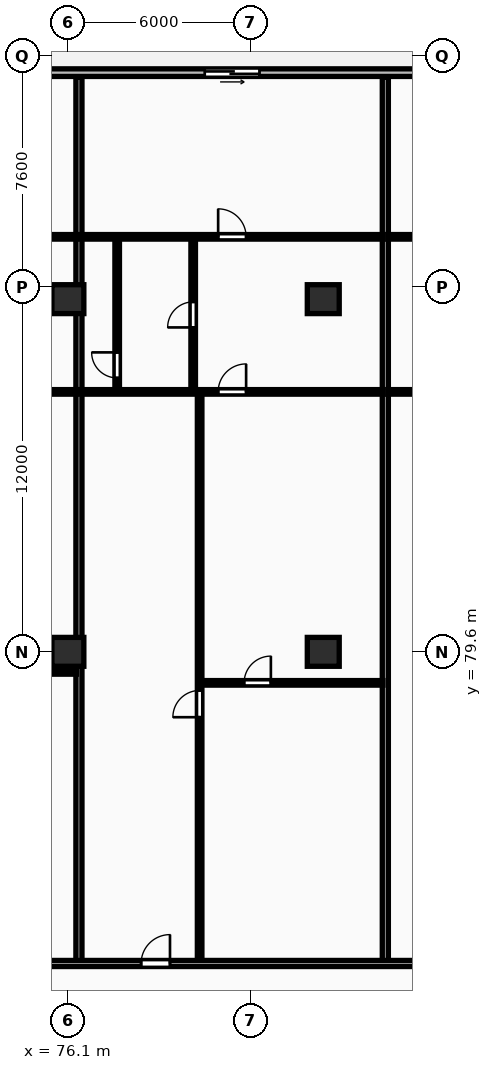
"""IFC4 building model, lengths in metres.
Left out: names, types, materials, properties, quantities, classifications, styles, units other than length and angle.
Written with IfcOpenShell. Run it as: python <this file> out.ifc"""

import sys

from ifc_helpers import new_model, si_unit, direction, frame, frame_2d, origin, origin_2d, place, context, subcontext, project, spatial, rectangle, extrude, element, fill, save


model = new_model("IFC4")
c1 = context("Model", 3, precision=1e-05, world=origin(), true_north=direction((0.0, 1.0)))
c2 = subcontext(c1, "Body", "Model", "MODEL_VIEW")
j1 = project(units=[si_unit("LENGTHUNIT", "METRE"), si_unit("PLANEANGLEUNIT", "RADIAN")], contexts=[c1])
p1 = place(None, origin())
s1 = spatial("IfcSite", under=j1, at=p1, CompositionType="ELEMENT")
p2 = place(p1, origin())
s2 = spatial("IfcBuilding", under=s1, at=p2, CompositionType="ELEMENT")
p3 = place(p2, frame((0.0, 0.0, 24.0)))
s3 = spatial("IfcBuildingStorey", under=s2, at=p3, CompositionType="ELEMENT", Elevation=24.0)
for number, where, z_axis, x_axis in (
    (1, (76.1, 79.6, 0.0), (0.0, 0.0, 1.0), (1.0, 0.0, 0.0)),
    (2, (76.1, 91.2, 0.0), (0.0, 0.0, 1.0), (1.0, 0.0, 0.0)),
    (3, (84.5, 79.6, 0.0), (0.0, 0.0, 1.0), (1.0, 0.0, 0.0)),
    (4, (84.5, 91.2, 0.0), (0.0, 0.0, 1.0), (1.0, 0.0, 0.0)),
):
    element("IfcColumn", number, at=place(p3, frame(where, z_axis=z_axis, x_axis=x_axis)), inside=s3, PredefinedType="COLUMN", context=c2, shape_type="SweptSolid", body=[
        extrude(rectangle(XDim=1.05, YDim=0.95, at=origin_2d()), origin(), (0.0, 0.0, 1.0), 3.25),
    ])
p4 = place(p3, frame((132.9, 98.65, 0.0), z_axis=(0.0, 0.0, 1.0), x_axis=(-1.0, 0.0, 0.0)))
e5 = element("IfcWall", 5, at=p4, inside=s3, PredefinedType="STANDARD", context=c2, shape_type="SweptSolid", body=[
    extrude(rectangle(XDim=77.6, YDim=0.25, at=frame_2d((38.8, 0.0))), origin(), (0.0, 0.0, 1.0), 2.97),
])
p5 = place(p4, frame((71.661, 0.0, 0.0)))
e6 = element("IfcOpeningElement", 6, at=p5, cuts=e5, PredefinedType="OPENING", context=c2, shape_type="SweptSolid", body=[
    extrude(rectangle(XDim=1.8, YDim=2.2, at=frame_2d((0.9, 1.1))), frame((0.0, 0.135, 0.0), z_axis=(0.0, -1.0, 0.0), x_axis=(1.0, 0.0, 0.0)), (0.0, 0.0, 1.0), 0.27),
])
p6 = place(p4, frame((61.079, 0.0, 0.0)))
e7 = element("IfcOpeningElement", 7, at=p6, cuts=e5, PredefinedType="OPENING", context=c2, shape_type="SweptSolid", body=[
    extrude(rectangle(XDim=1.8, YDim=2.2, at=frame_2d((0.9, 1.1))), frame((0.0, 0.135, 0.0), z_axis=(0.0, -1.0, 0.0), x_axis=(1.0, 0.0, 0.0)), (0.0, 0.0, 1.0), 0.27),
])
p7 = place(p4, frame((50.498, 0.0, 0.0)))
e8 = element("IfcOpeningElement", 8, at=p7, cuts=e5, PredefinedType="OPENING", context=c2, shape_type="SweptSolid", body=[
    extrude(rectangle(XDim=1.8, YDim=2.2, at=frame_2d((0.9, 1.1))), frame((0.0, 0.135, 0.0), z_axis=(0.0, -1.0, 0.0), x_axis=(1.0, 0.0, 0.0)), (0.0, 0.0, 1.0), 0.27),
])
p8 = place(p4, frame((39.412, 0.0, 0.0)))
e9 = element("IfcOpeningElement", 9, at=p8, cuts=e5, PredefinedType="OPENING", context=c2, shape_type="SweptSolid", body=[
    extrude(rectangle(XDim=1.8, YDim=2.2, at=frame_2d((0.9, 1.1))), frame((0.0, 0.135, 0.0), z_axis=(0.0, -1.0, 0.0), x_axis=(1.0, 0.0, 0.0)), (0.0, 0.0, 1.0), 0.27),
])
p9 = place(p4, frame((28.326, 0.0, 0.0)))
e10 = element("IfcOpeningElement", 10, at=p9, cuts=e5, PredefinedType="OPENING", context=c2, shape_type="SweptSolid", body=[
    extrude(rectangle(XDim=1.8, YDim=2.2, at=frame_2d((0.9, 1.1))), frame((0.0, 0.135, 0.0), z_axis=(0.0, -1.0, 0.0), x_axis=(1.0, 0.0, 0.0)), (0.0, 0.0, 1.0), 0.27),
])
p10 = place(p4, frame((17.744, 0.0, 0.0)))
e11 = element("IfcOpeningElement", 11, at=p10, cuts=e5, PredefinedType="OPENING", context=c2, shape_type="SweptSolid", body=[
    extrude(rectangle(XDim=1.8, YDim=2.2, at=frame_2d((0.9, 1.1))), frame((0.0, 0.135, 0.0), z_axis=(0.0, -1.0, 0.0), x_axis=(1.0, 0.0, 0.0)), (0.0, 0.0, 1.0), 0.27),
])
p11 = place(p4, frame((6.901, 0.0, 0.0)))
e12 = element("IfcOpeningElement", 12, at=p11, cuts=e5, PredefinedType="OPENING", context=c2, shape_type="SweptSolid", body=[
    extrude(rectangle(XDim=1.8, YDim=2.2, at=frame_2d((0.9, 1.1))), frame((0.0, 0.135, 0.0), z_axis=(0.0, -1.0, 0.0), x_axis=(1.0, 0.0, 0.0)), (0.0, 0.0, 1.0), 0.27),
])
p12 = place(p4, frame((0.6, 0.0, 0.85)))
e13 = element("IfcOpeningElement", 13, at=p12, cuts=e5, PredefinedType="OPENING", context=c2, shape_type="SweptSolid", body=[
    extrude(rectangle(XDim=1.8, YDim=1.8, at=frame_2d((0.9, 0.9))), frame((0.0, 0.135, 0.0), z_axis=(0.0, -1.0, 0.0), x_axis=(1.0, 0.0, 0.0)), (0.0, 0.0, 1.0), 0.27),
])
p13 = place(p3, frame((76.464, 69.43, 0.0), z_axis=(0.0, 0.0, 1.0), x_axis=(0.0, 1.0, 0.0)))
e14 = element("IfcWall", 14, at=p13, inside=s3, PredefinedType="PARTITIONING", context=c2, shape_type="SweptSolid", body=[
    extrude(rectangle(XDim=29.07, YDim=0.2, at=frame_2d((14.535, 0.0))), origin(), (0.0, 0.0, 1.0), 2.22),
])
p14 = place(p3, frame((69.408, 78.94, 0.0), z_axis=(0.0, 0.0, 1.0), x_axis=(1.0, 0.0, 0.0)))
e15 = element("IfcWall", 15, at=p14, inside=s3, PredefinedType="PARTITIONING", context=c2, shape_type="SweptSolid", body=[
    extrude(rectangle(XDim=6.976, YDim=0.15, at=frame_2d((3.488, 0.0))), origin(), (0.0, 0.0, 1.0), 2.97),
])
p15 = place(p14, frame((2.268, 0.0, 0.0)))
e16 = element("IfcOpeningElement", 16, at=p15, cuts=e15, PredefinedType="OPENING", context=c2, shape_type="SweptSolid", body=[
    extrude(rectangle(XDim=0.88, YDim=2.06, at=frame_2d((0.44, 1.03))), frame((0.0, 0.085, 0.0), z_axis=(0.0, -1.0, 0.0), x_axis=(1.0, 0.0, 0.0)), (0.0, 0.0, 1.0), 0.17),
])
p16 = place(p3, frame((65.458, 88.15, 0.0), z_axis=(0.0, 0.0, 1.0), x_axis=(1.0, 0.0, 0.0)))
e17 = element("IfcWall", 17, at=p16, inside=s3, PredefinedType="PARTITIONING", context=c2, shape_type="SweptSolid", body=[
    extrude(rectangle(XDim=10.926, YDim=0.15, at=frame_2d((5.463, 0.0))), origin(), (0.0, 0.0, 1.0), 2.97),
])
p17 = place(p16, frame((5.003, 0.0, 0.0)))
e18 = element("IfcOpeningElement", 18, at=p17, cuts=e17, PredefinedType="OPENING", context=c2, shape_type="SweptSolid", body=[
    extrude(rectangle(XDim=0.92, YDim=2.08, at=frame_2d((0.46, 1.04))), frame((0.0, 0.085, 0.0), z_axis=(0.0, -1.0, 0.0), x_axis=(1.0, 0.0, 0.0)), (0.0, 0.0, 1.0), 0.17),
])
p18 = place(p3, frame((65.458, 93.25, 0.0), z_axis=(0.0, 0.0, 1.0), x_axis=(1.0, 0.0, 0.0)))
e19 = element("IfcWall", 19, at=p18, inside=s3, PredefinedType="PARTITIONING", context=c2, shape_type="SweptSolid", body=[
    extrude(rectangle(XDim=10.926, YDim=0.15, at=frame_2d((5.463, 0.0))), origin(), (0.0, 0.0, 1.0), 2.97),
])
p19 = place(p18, frame((5.003, 0.0, 0.0)))
e20 = element("IfcOpeningElement", 20, at=p19, cuts=e19, PredefinedType="OPENING", context=c2, shape_type="SweptSolid", body=[
    extrude(rectangle(XDim=0.92, YDim=2.08, at=frame_2d((0.46, 1.04))), frame((0.0, 0.085, 0.0), z_axis=(0.0, -1.0, 0.0), x_axis=(1.0, 0.0, 0.0)), (0.0, 0.0, 1.0), 0.17),
])
p20 = place(p3, frame((86.542, 69.43, 0.0), z_axis=(0.0, 0.0, 1.0), x_axis=(0.0, 1.0, 0.0)))
e21 = element("IfcWall", 21, at=p20, inside=s3, PredefinedType="PARTITIONING", context=c2, shape_type="SweptSolid", body=[
    extrude(rectangle(XDim=29.07, YDim=0.2, at=frame_2d((14.535, 0.0))), origin(), (0.0, 0.0, 1.0), 2.97),
])
p21 = place(p3, frame((80.494, 78.58, 0.0), z_axis=(0.0, 0.0, 1.0), x_axis=(1.0, 0.0, 0.0)))
e22 = element("IfcWall", 22, at=p21, inside=s3, PredefinedType="PARTITIONING", context=c2, shape_type="SweptSolid", body=[
    extrude(rectangle(XDim=5.968, YDim=0.15, at=frame_2d((2.984, 0.0))), origin(), (0.0, 0.0, 1.0), 2.97),
])
p22 = place(p21, frame((1.403, 0.0, 0.0)))
e23 = element("IfcOpeningElement", 23, at=p22, cuts=e22, PredefinedType="OPENING", context=c2, shape_type="SweptSolid", body=[
    extrude(rectangle(XDim=0.88, YDim=2.06, at=frame_2d((0.44, 1.03))), frame((0.0, 0.085, 0.0), z_axis=(0.0, -1.0, 0.0), x_axis=(1.0, 0.0, 0.0)), (0.0, 0.0, 1.0), 0.17),
])
p23 = place(p3, frame((80.434, 69.41, 0.0), z_axis=(0.0, 0.0, 1.0), x_axis=(0.0, 1.0, 0.0)))
e24 = element("IfcWall", 24, at=p23, inside=s3, PredefinedType="PARTITIONING", context=c2, shape_type="SweptSolid", body=[
    extrude(rectangle(XDim=18.7, YDim=0.15, at=frame_2d((9.35, 0.0))), origin(), (0.0, 0.0, 1.0), 2.97),
])
p24 = place(p23, frame((8.04, 0.0, 0.0)))
e25 = element("IfcOpeningElement", 25, at=p24, cuts=e24, PredefinedType="OPENING", context=c2, shape_type="SweptSolid", body=[
    extrude(rectangle(XDim=0.88, YDim=2.06, at=frame_2d((0.44, 1.03))), frame((0.0, 0.085, 0.0), z_axis=(0.0, -1.0, 0.0), x_axis=(1.0, 0.0, 0.0)), (0.0, 0.0, 1.0), 0.17),
])
p25 = place(p3, frame((77.721, 88.19, 0.0), z_axis=(0.0, 0.0, 1.0), x_axis=(0.0, 1.0, 0.0)))
e26 = element("IfcWall", 26, at=p25, inside=s3, PredefinedType="PARTITIONING", context=c2, shape_type="SweptSolid", body=[
    extrude(rectangle(XDim=5.0, YDim=0.15, at=frame_2d((2.5, 0.0))), origin(), (0.0, 0.0, 1.0), 2.97),
])
p26 = place(p25, frame((0.419, 0.0, 0.0)))
e27 = element("IfcOpeningElement", 27, at=p26, cuts=e26, PredefinedType="OPENING", context=c2, shape_type="SweptSolid", body=[
    extrude(rectangle(XDim=0.84, YDim=2.04, at=frame_2d((0.42, 1.02))), frame((0.0, 0.085, 0.0), z_axis=(0.0, -1.0, 0.0), x_axis=(1.0, 0.0, 0.0)), (0.0, 0.0, 1.0), 0.17),
])
p27 = place(p3, frame((80.221, 88.19, 0.0), z_axis=(0.0, 0.0, 1.0), x_axis=(0.0, 1.0, 0.0)))
e28 = element("IfcWall", 28, at=p27, inside=s3, PredefinedType="PARTITIONING", context=c2, shape_type="SweptSolid", body=[
    extrude(rectangle(XDim=5.0, YDim=0.15, at=frame_2d((2.5, 0.0))), origin(), (0.0, 0.0, 1.0), 2.97),
])
p28 = place(p27, frame((2.08, 0.0, 0.0)))
e29 = element("IfcOpeningElement", 29, at=p28, cuts=e28, PredefinedType="OPENING", context=c2, shape_type="SweptSolid", body=[
    extrude(rectangle(XDim=0.84, YDim=2.04, at=frame_2d((0.42, 1.02))), frame((0.0, 0.085, 0.0), z_axis=(0.0, -1.0, 0.0), x_axis=(1.0, 0.0, 0.0)), (0.0, 0.0, 1.0), 0.17),
])
p29 = place(p3, frame((76.544, 88.15, 0.0), z_axis=(0.0, 0.0, 1.0), x_axis=(1.0, 0.0, 0.0)))
e30 = element("IfcWall", 30, at=p29, inside=s3, PredefinedType="PARTITIONING", context=c2, shape_type="SweptSolid", body=[
    extrude(rectangle(XDim=9.918, YDim=0.15, at=frame_2d((4.959, 0.0))), origin(), (0.0, 0.0, 1.0), 2.97),
])
p30 = place(p29, frame((4.499, 0.0, 0.0)))
e31 = element("IfcOpeningElement", 31, at=p30, cuts=e30, PredefinedType="OPENING", context=c2, shape_type="SweptSolid", body=[
    extrude(rectangle(XDim=0.92, YDim=2.08, at=frame_2d((0.46, 1.04))), frame((0.0, 0.085, 0.0), z_axis=(0.0, -1.0, 0.0), x_axis=(1.0, 0.0, 0.0)), (0.0, 0.0, 1.0), 0.17),
])
p31 = place(p3, frame((76.544, 93.25, 0.0), z_axis=(0.0, 0.0, 1.0), x_axis=(1.0, 0.0, 0.0)))
e32 = element("IfcWall", 32, at=p31, inside=s3, PredefinedType="PARTITIONING", context=c2, shape_type="SweptSolid", body=[
    extrude(rectangle(XDim=9.918, YDim=0.15, at=frame_2d((4.959, 0.0))), origin(), (0.0, 0.0, 1.0), 2.97),
])
p32 = place(p31, frame((4.499, 0.0, 0.0)))
e33 = element("IfcOpeningElement", 33, at=p32, cuts=e32, PredefinedType="OPENING", context=c2, shape_type="SweptSolid", body=[
    extrude(rectangle(XDim=0.92, YDim=2.08, at=frame_2d((0.46, 1.04))), frame((0.0, 0.085, 0.0), z_axis=(0.0, -1.0, 0.0), x_axis=(1.0, 0.0, 0.0)), (0.0, 0.0, 1.0), 0.17),
])
p33 = place(p3, frame((86.622, 88.15, 0.0), z_axis=(0.0, 0.0, 1.0), x_axis=(1.0, 0.0, 0.0)))
e34 = element("IfcWall", 34, at=p33, inside=s3, PredefinedType="PARTITIONING", context=c2, shape_type="SweptSolid", body=[
    extrude(rectangle(XDim=11.933, YDim=0.15, at=frame_2d((5.967, 0.0))), origin(), (0.0, 0.0, 1.0), 2.97),
])
p34 = place(p33, frame((5.914, 0.0, 0.0)))
e35 = element("IfcOpeningElement", 35, at=p34, cuts=e34, PredefinedType="OPENING", context=c2, shape_type="SweptSolid", body=[
    extrude(rectangle(XDim=0.92, YDim=2.08, at=frame_2d((0.46, 1.04))), frame((0.0, 0.085, 0.0), z_axis=(0.0, -1.0, 0.0), x_axis=(1.0, 0.0, 0.0)), (0.0, 0.0, 1.0), 0.17),
])
p35 = place(p3, frame((86.622, 93.25, 0.0), z_axis=(0.0, 0.0, 1.0), x_axis=(1.0, 0.0, 0.0)))
e36 = element("IfcWall", 36, at=p35, inside=s3, PredefinedType="PARTITIONING", context=c2, shape_type="SweptSolid", body=[
    extrude(rectangle(XDim=11.933, YDim=0.15, at=frame_2d((5.967, 0.0))), origin(), (0.0, 0.0, 1.0), 2.97),
])
p36 = place(p35, frame((8.812, 0.0, 0.0)))
e37 = element("IfcOpeningElement", 37, at=p36, cuts=e36, PredefinedType="OPENING", context=c2, shape_type="SweptSolid", body=[
    extrude(rectangle(XDim=0.92, YDim=2.08, at=frame_2d((0.46, 1.04))), frame((0.0, 0.085, 0.0), z_axis=(0.0, -1.0, 0.0), x_axis=(1.0, 0.0, 0.0)), (0.0, 0.0, 1.0), 0.17),
])
p37 = place(p3, frame((55.3, 69.35, 0.0), z_axis=(0.0, 0.0, 1.0), x_axis=(1.0, 0.0, 0.0)))
e38 = element("IfcWall", 38, at=p37, inside=s3, PredefinedType="PARTITIONING", context=c2, shape_type="SweptSolid", body=[
    extrude(rectangle(XDim=77.6, YDim=0.2, at=frame_2d((38.8, 0.0))), origin(), (0.0, 0.0, 1.0), 2.97),
])
p38 = place(p37, frame((1.81, 0.0, 0.0)))
e39 = element("IfcOpeningElement", 39, at=p38, cuts=e38, PredefinedType="OPENING", context=c2, shape_type="SweptSolid", body=[
    extrude(rectangle(XDim=0.95, YDim=2.15, at=frame_2d((0.475, 1.075))), frame((0.0, 0.11, 0.0), z_axis=(0.0, -1.0, 0.0), x_axis=(1.0, 0.0, 0.0)), (0.0, 0.0, 1.0), 0.22),
])
p39 = place(p37, frame((10.448, 0.0, 0.0)))
e40 = element("IfcOpeningElement", 40, at=p39, cuts=e38, PredefinedType="OPENING", context=c2, shape_type="SweptSolid", body=[
    extrude(rectangle(XDim=0.95, YDim=2.15, at=frame_2d((0.475, 1.075))), frame((0.0, 0.11, 0.0), z_axis=(0.0, -1.0, 0.0), x_axis=(1.0, 0.0, 0.0)), (0.0, 0.0, 1.0), 0.22),
])
p40 = place(p37, frame((23.208, 0.0, 0.0)))
e41 = element("IfcOpeningElement", 41, at=p40, cuts=e38, PredefinedType="OPENING", context=c2, shape_type="SweptSolid", body=[
    extrude(rectangle(XDim=0.95, YDim=2.15, at=frame_2d((0.475, 1.075))), frame((0.0, 0.11, 0.0), z_axis=(0.0, -1.0, 0.0), x_axis=(1.0, 0.0, 0.0)), (0.0, 0.0, 1.0), 0.22),
])
p41 = place(p37, frame((33.287, 0.0, 0.0)))
e42 = element("IfcOpeningElement", 42, at=p41, cuts=e38, PredefinedType="OPENING", context=c2, shape_type="SweptSolid", body=[
    extrude(rectangle(XDim=0.95, YDim=2.15, at=frame_2d((0.475, 1.075))), frame((0.0, 0.11, 0.0), z_axis=(0.0, -1.0, 0.0), x_axis=(1.0, 0.0, 0.0)), (0.0, 0.0, 1.0), 0.22),
])
p42 = place(p37, frame((44.905, 0.0, 0.0)))
e43 = element("IfcOpeningElement", 43, at=p42, cuts=e38, PredefinedType="OPENING", context=c2, shape_type="SweptSolid", body=[
    extrude(rectangle(XDim=0.95, YDim=2.15, at=frame_2d((0.475, 1.075))), frame((0.0, 0.11, 0.0), z_axis=(0.0, -1.0, 0.0), x_axis=(1.0, 0.0, 0.0)), (0.0, 0.0, 1.0), 0.22),
])
p43 = place(p37, frame((54.119, 0.0, 0.0)))
e44 = element("IfcOpeningElement", 44, at=p43, cuts=e38, PredefinedType="OPENING", context=c2, shape_type="SweptSolid", body=[
    extrude(rectangle(XDim=0.95, YDim=2.15, at=frame_2d((0.475, 1.075))), frame((0.0, 0.11, 0.0), z_axis=(0.0, -1.0, 0.0), x_axis=(1.0, 0.0, 0.0)), (0.0, 0.0, 1.0), 0.22),
])
p44 = place(p37, frame((66.74, 0.0, 0.0)))
e45 = element("IfcOpeningElement", 45, at=p44, cuts=e38, PredefinedType="OPENING", context=c2, shape_type="SweptSolid", body=[
    extrude(rectangle(XDim=0.95, YDim=2.15, at=frame_2d((0.475, 1.075))), frame((0.0, 0.11, 0.0), z_axis=(0.0, -1.0, 0.0), x_axis=(1.0, 0.0, 0.0)), (0.0, 0.0, 1.0), 0.22),
])
p45 = place(p7, origin())
e46 = element("IfcDoor", 46, at=p45, inside=s3, OperationType="SLIDING_TO_LEFT", PredefinedType="DOOR", context=c2, shape_type="SweptSolid", body=[
    extrude(rectangle(XDim=1.8, YDim=2.2, at=frame_2d((0.9, 1.1))), frame((0.0, 0.025, 0.0), z_axis=(0.0, -1.0, 0.0), x_axis=(1.0, 0.0, 0.0)), (0.0, 0.0, 1.0), 0.05),
])
fill(e8, e46)
p46 = place(p22, origin())
e47 = element("IfcDoor", 47, at=p46, inside=s3, OperationType="SINGLE_SWING_RIGHT", PredefinedType="DOOR", context=c2, shape_type="SweptSolid", body=[
    extrude(rectangle(XDim=0.88, YDim=2.06, at=frame_2d((0.44, 1.03))), frame((0.0, 0.025, 0.0), z_axis=(0.0, -1.0, 0.0), x_axis=(1.0, 0.0, 0.0)), (0.0, 0.0, 1.0), 0.05),
])
fill(e23, e47)
p47 = place(p24, origin())
e48 = element("IfcDoor", 48, at=p47, inside=s3, OperationType="SINGLE_SWING_LEFT", PredefinedType="DOOR", context=c2, shape_type="SweptSolid", body=[
    extrude(rectangle(XDim=0.88, YDim=2.06, at=frame_2d((0.44, 1.03))), frame((0.0, 0.025, 0.0), z_axis=(0.0, -1.0, 0.0), x_axis=(1.0, 0.0, 0.0)), (0.0, 0.0, 1.0), 0.05),
])
fill(e25, e48)
p48 = place(p26, origin())
e49 = element("IfcDoor", 49, at=p48, inside=s3, OperationType="SINGLE_SWING_RIGHT", PredefinedType="DOOR", context=c2, shape_type="SweptSolid", body=[
    extrude(rectangle(XDim=0.84, YDim=2.04, at=frame_2d((0.42, 1.02))), frame((0.0, 0.025, 0.0), z_axis=(0.0, -1.0, 0.0), x_axis=(1.0, 0.0, 0.0)), (0.0, 0.0, 1.0), 0.05),
])
fill(e27, e49)
p49 = place(p28, origin())
e50 = element("IfcDoor", 50, at=p49, inside=s3, OperationType="SINGLE_SWING_LEFT", PredefinedType="DOOR", context=c2, shape_type="SweptSolid", body=[
    extrude(rectangle(XDim=0.84, YDim=2.04, at=frame_2d((0.42, 1.02))), frame((0.0, 0.025, 0.0), z_axis=(0.0, -1.0, 0.0), x_axis=(1.0, 0.0, 0.0)), (0.0, 0.0, 1.0), 0.05),
])
fill(e29, e50)
p50 = place(p30, origin())
e51 = element("IfcDoor", 51, at=p50, inside=s3, OperationType="SINGLE_SWING_RIGHT", PredefinedType="DOOR", context=c2, shape_type="SweptSolid", body=[
    extrude(rectangle(XDim=0.92, YDim=2.08, at=frame_2d((0.46, 1.04))), frame((0.0, 0.025, 0.0), z_axis=(0.0, -1.0, 0.0), x_axis=(1.0, 0.0, 0.0)), (0.0, 0.0, 1.0), 0.05),
])
fill(e31, e51)
p51 = place(p32, origin())
e52 = element("IfcDoor", 52, at=p51, inside=s3, OperationType="SINGLE_SWING_LEFT", PredefinedType="DOOR", context=c2, shape_type="SweptSolid", body=[
    extrude(rectangle(XDim=0.92, YDim=2.08, at=frame_2d((0.46, 1.04))), frame((0.0, 0.025, 0.0), z_axis=(0.0, -1.0, 0.0), x_axis=(1.0, 0.0, 0.0)), (0.0, 0.0, 1.0), 0.05),
])
fill(e33, e52)
p52 = place(p40, origin())
e53 = element("IfcDoor", 53, at=p52, inside=s3, OperationType="SINGLE_SWING_RIGHT", PredefinedType="DOOR", context=c2, shape_type="SweptSolid", body=[
    extrude(rectangle(XDim=0.95, YDim=2.15, at=frame_2d((0.475, 1.075))), frame((0.0, 0.025, 0.0), z_axis=(0.0, -1.0, 0.0), x_axis=(1.0, 0.0, 0.0)), (0.0, 0.0, 1.0), 0.05),
])
fill(e41, e53)
save(model, sys.argv[1])
